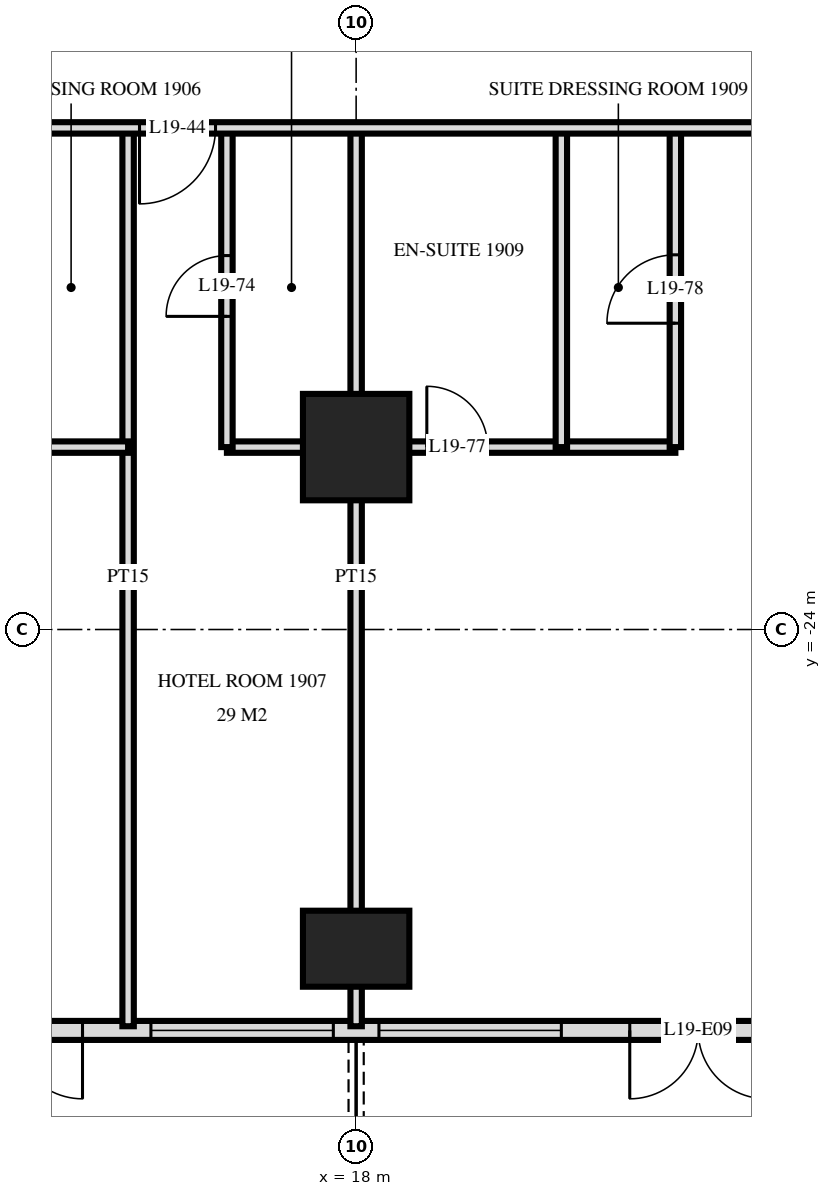
"""IFC4 building model, lengths in metres.
Left out: names, types, materials, properties, quantities, classifications, styles, units other than length and angle.
Written with IfcOpenShell. Run it as: python <this file> out.ifc"""

import sys

from ifc_helpers import new_model, si_unit, direction, frame, frame_2d, origin, origin_2d, place, context, subcontext, project, spatial, rectangle, extrude, element, fill, save


model = new_model("IFC4")
c1 = context("Model", 3, precision=1e-05, world=origin(), true_north=direction((0.0, 1.0)))
c2 = subcontext(c1, "Body", "Model", "MODEL_VIEW")
j1 = project(units=[si_unit("LENGTHUNIT", "METRE"), si_unit("PLANEANGLEUNIT", "RADIAN")], contexts=[c1])
p1 = place(None, origin())
s1 = spatial("IfcSite", under=j1, at=p1, CompositionType="ELEMENT")
p2 = place(p1, origin())
s2 = spatial("IfcBuilding", under=s1, at=p2, CompositionType="ELEMENT")
p3 = place(p2, frame((0.0, 0.0, 78.0)))
s3 = spatial("IfcBuildingStorey", under=s2, at=p3, CompositionType="ELEMENT", Elevation=78.0)
p4 = place(p3, frame((18.0, -28.2, 0.0), z_axis=(0.0, 0.0, 1.0), x_axis=(1.0, 0.0, 0.0)))
e1 = element("IfcColumn", 1, at=p4, inside=s3, PredefinedType="COLUMN", context=c2, shape_type="SweptSolid", body=[
    extrude(rectangle(XDim=1.4, YDim=1.0, at=origin_2d()), origin(), (0.0, 0.0, 1.0), 3.6),
])
p5 = place(p3, frame((18.0, -21.6, 0.0), z_axis=(0.0, 0.0, 1.0), x_axis=(1.0, 0.0, 0.0)))
e2 = element("IfcColumn", 2, at=p5, inside=s3, PredefinedType="COLUMN", context=c2, shape_type="SweptSolid", body=[
    extrude(rectangle(XDim=1.4, YDim=1.4, at=origin_2d()), origin(), (0.0, 0.0, 1.0), 3.6),
])
p6 = place(p3, frame((-28.775, -29.275, 0.0), z_axis=(0.0, 0.0, 1.0), x_axis=(1.0, 0.0, 0.0)))
e3 = element("IfcWall", 3, at=p6, inside=s3, PredefinedType="SOLIDWALL", context=c2, shape_type="SweptSolid", body=[
    extrude(rectangle(XDim=57.551, YDim=0.25, at=frame_2d((28.775, 0.0))), origin(), (0.0, 0.0, 1.0), 3.32),
])
p7 = place(p6, frame((0.575, 0.0, 0.0)))
e4 = element("IfcOpeningElement", 4, at=p7, cuts=e3, PredefinedType="OPENING", context=c2, shape_type="SweptSolid", body=[
    extrude(rectangle(XDim=1.8, YDim=2.4, at=frame_2d((0.9, 1.2))), frame((0.0, 0.135, 0.0), z_axis=(0.0, -1.0, 0.0), x_axis=(1.0, 0.0, 0.0)), (0.0, 0.0, 1.0), 0.27),
])
p8 = place(p6, frame((5.375, 0.0, 0.0)))
e5 = element("IfcOpeningElement", 5, at=p8, cuts=e3, PredefinedType="OPENING", context=c2, shape_type="SweptSolid", body=[
    extrude(rectangle(XDim=1.8, YDim=2.4, at=frame_2d((0.9, 1.2))), frame((0.0, 0.135, 0.0), z_axis=(0.0, -1.0, 0.0), x_axis=(1.0, 0.0, 0.0)), (0.0, 0.0, 1.0), 0.27),
])
p9 = place(p6, frame((8.075, 0.0, 0.3)))
e6 = element("IfcOpeningElement", 6, at=p9, cuts=e3, PredefinedType="OPENING", context=c2, shape_type="SweptSolid", body=[
    extrude(rectangle(XDim=2.4, YDim=2.1, at=frame_2d((1.2, 1.05))), frame((0.0, 0.135, 0.0), z_axis=(0.0, -1.0, 0.0), x_axis=(1.0, 0.0, 0.0)), (0.0, 0.0, 1.0), 0.27),
])
p10 = place(p6, frame((11.375, 0.0, 0.0)))
e7 = element("IfcOpeningElement", 7, at=p10, cuts=e3, PredefinedType="OPENING", context=c2, shape_type="SweptSolid", body=[
    extrude(rectangle(XDim=1.8, YDim=2.4, at=frame_2d((0.9, 1.2))), frame((0.0, 0.135, 0.0), z_axis=(0.0, -1.0, 0.0), x_axis=(1.0, 0.0, 0.0)), (0.0, 0.0, 1.0), 0.27),
])
p11 = place(p6, frame((14.075, 0.0, 0.3)))
e8 = element("IfcOpeningElement", 8, at=p11, cuts=e3, PredefinedType="OPENING", context=c2, shape_type="SweptSolid", body=[
    extrude(rectangle(XDim=2.4, YDim=2.1, at=frame_2d((1.2, 1.05))), frame((0.0, 0.135, 0.0), z_axis=(0.0, -1.0, 0.0), x_axis=(1.0, 0.0, 0.0)), (0.0, 0.0, 1.0), 0.27),
])
p12 = place(p6, frame((17.075, 0.0, 0.3)))
e9 = element("IfcOpeningElement", 9, at=p12, cuts=e3, PredefinedType="OPENING", context=c2, shape_type="SweptSolid", body=[
    extrude(rectangle(XDim=2.4, YDim=2.1, at=frame_2d((1.2, 1.05))), frame((0.0, 0.135, 0.0), z_axis=(0.0, -1.0, 0.0), x_axis=(1.0, 0.0, 0.0)), (0.0, 0.0, 1.0), 0.27),
])
p13 = place(p6, frame((20.375, 0.0, 0.0)))
e10 = element("IfcOpeningElement", 10, at=p13, cuts=e3, PredefinedType="OPENING", context=c2, shape_type="SweptSolid", body=[
    extrude(rectangle(XDim=1.8, YDim=2.4, at=frame_2d((0.9, 1.2))), frame((0.0, 0.135, 0.0), z_axis=(0.0, -1.0, 0.0), x_axis=(1.0, 0.0, 0.0)), (0.0, 0.0, 1.0), 0.27),
])
p14 = place(p6, frame((23.375, 0.0, 0.0)))
e11 = element("IfcOpeningElement", 11, at=p14, cuts=e3, PredefinedType="OPENING", context=c2, shape_type="SweptSolid", body=[
    extrude(rectangle(XDim=1.8, YDim=2.4, at=frame_2d((0.9, 1.2))), frame((0.0, 0.135, 0.0), z_axis=(0.0, -1.0, 0.0), x_axis=(1.0, 0.0, 0.0)), (0.0, 0.0, 1.0), 0.27),
])
p15 = place(p6, frame((26.075, 0.0, 0.3)))
e12 = element("IfcOpeningElement", 12, at=p15, cuts=e3, PredefinedType="OPENING", context=c2, shape_type="SweptSolid", body=[
    extrude(rectangle(XDim=2.4, YDim=2.1, at=frame_2d((1.2, 1.05))), frame((0.0, 0.135, 0.0), z_axis=(0.0, -1.0, 0.0), x_axis=(1.0, 0.0, 0.0)), (0.0, 0.0, 1.0), 0.27),
])
p16 = place(p6, frame((29.375, 0.0, 0.0)))
e13 = element("IfcOpeningElement", 13, at=p16, cuts=e3, PredefinedType="OPENING", context=c2, shape_type="SweptSolid", body=[
    extrude(rectangle(XDim=1.8, YDim=2.4, at=frame_2d((0.9, 1.2))), frame((0.0, 0.135, 0.0), z_axis=(0.0, -1.0, 0.0), x_axis=(1.0, 0.0, 0.0)), (0.0, 0.0, 1.0), 0.27),
])
p17 = place(p6, frame((32.075, 0.0, 0.3)))
e14 = element("IfcOpeningElement", 14, at=p17, cuts=e3, PredefinedType="OPENING", context=c2, shape_type="SweptSolid", body=[
    extrude(rectangle(XDim=2.4, YDim=2.1, at=frame_2d((1.2, 1.05))), frame((0.0, 0.135, 0.0), z_axis=(0.0, -1.0, 0.0), x_axis=(1.0, 0.0, 0.0)), (0.0, 0.0, 1.0), 0.27),
])
p18 = place(p6, frame((35.375, 0.0, 0.0)))
e15 = element("IfcOpeningElement", 15, at=p18, cuts=e3, PredefinedType="OPENING", context=c2, shape_type="SweptSolid", body=[
    extrude(rectangle(XDim=1.8, YDim=2.4, at=frame_2d((0.9, 1.2))), frame((0.0, 0.135, 0.0), z_axis=(0.0, -1.0, 0.0), x_axis=(1.0, 0.0, 0.0)), (0.0, 0.0, 1.0), 0.27),
])
p19 = place(p6, frame((38.075, 0.0, 0.3)))
e16 = element("IfcOpeningElement", 16, at=p19, cuts=e3, PredefinedType="OPENING", context=c2, shape_type="SweptSolid", body=[
    extrude(rectangle(XDim=2.4, YDim=2.1, at=frame_2d((1.2, 1.05))), frame((0.0, 0.135, 0.0), z_axis=(0.0, -1.0, 0.0), x_axis=(1.0, 0.0, 0.0)), (0.0, 0.0, 1.0), 0.27),
])
p20 = place(p6, frame((41.375, 0.0, 0.0)))
e17 = element("IfcOpeningElement", 17, at=p20, cuts=e3, PredefinedType="OPENING", context=c2, shape_type="SweptSolid", body=[
    extrude(rectangle(XDim=1.8, YDim=2.4, at=frame_2d((0.9, 1.2))), frame((0.0, 0.135, 0.0), z_axis=(0.0, -1.0, 0.0), x_axis=(1.0, 0.0, 0.0)), (0.0, 0.0, 1.0), 0.27),
])
p21 = place(p6, frame((44.075, 0.0, 0.3)))
e18 = element("IfcOpeningElement", 18, at=p21, cuts=e3, PredefinedType="OPENING", context=c2, shape_type="SweptSolid", body=[
    extrude(rectangle(XDim=2.4, YDim=2.1, at=frame_2d((1.2, 1.05))), frame((0.0, 0.135, 0.0), z_axis=(0.0, -1.0, 0.0), x_axis=(1.0, 0.0, 0.0)), (0.0, 0.0, 1.0), 0.27),
])
p22 = place(p6, frame((47.075, 0.0, 0.3)))
e19 = element("IfcOpeningElement", 19, at=p22, cuts=e3, PredefinedType="OPENING", context=c2, shape_type="SweptSolid", body=[
    extrude(rectangle(XDim=2.4, YDim=2.1, at=frame_2d((1.2, 1.05))), frame((0.0, 0.135, 0.0), z_axis=(0.0, -1.0, 0.0), x_axis=(1.0, 0.0, 0.0)), (0.0, 0.0, 1.0), 0.27),
])
p23 = place(p6, frame((50.375, 0.0, 0.0)))
e20 = element("IfcOpeningElement", 20, at=p23, cuts=e3, PredefinedType="OPENING", context=c2, shape_type="SweptSolid", body=[
    extrude(rectangle(XDim=1.8, YDim=2.4, at=frame_2d((0.9, 1.2))), frame((0.0, 0.135, 0.0), z_axis=(0.0, -1.0, 0.0), x_axis=(1.0, 0.0, 0.0)), (0.0, 0.0, 1.0), 0.27),
])
p24 = place(p6, frame((53.375, 0.0, 0.0)))
e21 = element("IfcOpeningElement", 21, at=p24, cuts=e3, PredefinedType="OPENING", context=c2, shape_type="SweptSolid", body=[
    extrude(rectangle(XDim=1.8, YDim=2.4, at=frame_2d((0.9, 1.2))), frame((0.0, 0.135, 0.0), z_axis=(0.0, -1.0, 0.0), x_axis=(1.0, 0.0, 0.0)), (0.0, 0.0, 1.0), 0.27),
])
p25 = place(p3, frame((22.2, -21.6, 0.0), z_axis=(0.0, 0.0, 1.0), x_axis=(0.0, 1.0, 0.0)))
e22 = element("IfcWall", 22, at=p25, inside=s3, PredefinedType="PARTITIONING", context=c2, shape_type="SweptSolid", body=[
    extrude(rectangle(XDim=4.2, YDim=0.15, at=frame_2d((2.1, 0.0))), origin(), (0.0, 0.0, 1.0), 3.32),
])
p26 = place(p25, frame((1.63, 0.0, 0.0)))
e23 = element("IfcOpeningElement", 23, at=p26, cuts=e22, PredefinedType="OPENING", context=c2, shape_type="SweptSolid", body=[
    extrude(rectangle(XDim=0.9, YDim=2.1, at=frame_2d((0.45, 1.05))), frame((0.0, 0.085, 0.0), z_axis=(0.0, -1.0, 0.0), x_axis=(1.0, 0.0, 0.0)), (0.0, 0.0, 1.0), 0.17),
])
p27 = place(p3, frame((20.7, -21.6, 0.0), z_axis=(0.0, 0.0, 1.0), x_axis=(0.0, 1.0, 0.0)))
e24 = element("IfcWall", 24, at=p27, inside=s3, PredefinedType="PARTITIONING", context=c2, shape_type="SweptSolid", body=[
    extrude(rectangle(XDim=4.2, YDim=0.15, at=frame_2d((2.1, 0.0))), origin(), (0.0, 0.0, 1.0), 3.32),
])
p28 = place(p3, frame((18.0, -29.22, 0.0), z_axis=(0.0, 0.0, 1.0), x_axis=(0.0, 1.0, 0.0)))
e25 = element("IfcWall", 25, at=p28, inside=s3, PredefinedType="PARTITIONING", context=c2, shape_type="SweptSolid", body=[
    extrude(rectangle(XDim=11.82, YDim=0.15, at=frame_2d((5.91, 0.0))), origin(), (0.0, 0.0, 1.0), 3.32),
])
p29 = place(p3, frame((16.3, -21.6, 0.0), z_axis=(0.0, 0.0, 1.0), x_axis=(0.0, 1.0, 0.0)))
e26 = element("IfcWall", 26, at=p29, inside=s3, PredefinedType="PARTITIONING", context=c2, shape_type="SweptSolid", body=[
    extrude(rectangle(XDim=4.2, YDim=0.15, at=frame_2d((2.1, 0.0))), origin(), (0.0, 0.0, 1.0), 3.32),
])
p30 = place(p29, frame((1.72, 0.0, 0.0)))
e27 = element("IfcOpeningElement", 27, at=p30, cuts=e26, PredefinedType="OPENING", context=c2, shape_type="SweptSolid", body=[
    extrude(rectangle(XDim=0.8, YDim=2.1, at=frame_2d((0.4, 1.05))), frame((0.0, 0.085, 0.0), z_axis=(0.0, -1.0, 0.0), x_axis=(1.0, 0.0, 0.0)), (0.0, 0.0, 1.0), 0.17),
])
p31 = place(p3, frame((15.0, -29.22, 0.0), z_axis=(0.0, 0.0, 1.0), x_axis=(0.0, 1.0, 0.0)))
e28 = element("IfcWall", 28, at=p31, inside=s3, PredefinedType="PARTITIONING", context=c2, shape_type="SweptSolid", body=[
    extrude(rectangle(XDim=11.82, YDim=0.15, at=frame_2d((5.91, 0.0))), origin(), (0.0, 0.0, 1.0), 3.32),
])
p32 = place(p3, frame((13.5, -21.6, 0.0), z_axis=(0.0, 0.0, 1.0), x_axis=(1.0, 0.0, 0.0)))
e29 = element("IfcWall", 29, at=p32, inside=s3, PredefinedType="PARTITIONING", context=c2, shape_type="SweptSolid", body=[
    extrude(rectangle(XDim=1.5, YDim=0.15, at=frame_2d((0.75, 0.0))), origin(), (0.0, 0.0, 1.0), 3.32),
])
p33 = place(p3, frame((16.3, -21.6, 0.0), z_axis=(0.0, 0.0, 1.0), x_axis=(1.0, 0.0, 0.0)))
e30 = element("IfcWall", 30, at=p33, inside=s3, PredefinedType="PARTITIONING", context=c2, shape_type="SweptSolid", body=[
    extrude(rectangle(XDim=5.9, YDim=0.15, at=frame_2d((2.95, 0.0))), origin(), (0.0, 0.0, 1.0), 3.32),
])
p34 = place(p33, frame((2.63, 0.0, 0.0)))
e31 = element("IfcOpeningElement", 31, at=p34, cuts=e30, PredefinedType="OPENING", context=c2, shape_type="SweptSolid", body=[
    extrude(rectangle(XDim=0.8, YDim=2.1, at=frame_2d((0.4, 1.05))), frame((0.0, 0.085, 0.0), z_axis=(0.0, -1.0, 0.0), x_axis=(1.0, 0.0, 0.0)), (0.0, 0.0, 1.0), 0.17),
])
p35 = place(p3, frame((-33.12, -17.4, 0.0), z_axis=(0.0, 0.0, 1.0), x_axis=(1.0, 0.0, 0.0)))
e32 = element("IfcWall", 32, at=p35, inside=s3, PredefinedType="PARTITIONING", context=c2, shape_type="SweptSolid", body=[
    extrude(rectangle(XDim=66.24, YDim=0.15, at=frame_2d((33.12, 0.0))), origin(), (0.0, 0.0, 1.0), 3.32),
])
p36 = place(p35, frame((10.27, 0.0, 0.0)))
e33 = element("IfcOpeningElement", 33, at=p36, cuts=e32, PredefinedType="OPENING", context=c2, shape_type="SweptSolid", body=[
    extrude(rectangle(XDim=1.0, YDim=2.1, at=frame_2d((0.5, 1.05))), frame((0.0, 0.085, 0.0), z_axis=(0.0, -1.0, 0.0), x_axis=(1.0, 0.0, 0.0)), (0.0, 0.0, 1.0), 0.17),
])
p37 = place(p35, frame((16.97, 0.0, 0.0)))
e34 = element("IfcOpeningElement", 34, at=p37, cuts=e32, PredefinedType="OPENING", context=c2, shape_type="SweptSolid", body=[
    extrude(rectangle(XDim=1.0, YDim=2.1, at=frame_2d((0.5, 1.05))), frame((0.0, 0.085, 0.0), z_axis=(0.0, -1.0, 0.0), x_axis=(1.0, 0.0, 0.0)), (0.0, 0.0, 1.0), 0.17),
])
p38 = place(p35, frame((28.42, 0.0, 0.0)))
e35 = element("IfcOpeningElement", 35, at=p38, cuts=e32, PredefinedType="OPENING", context=c2, shape_type="SweptSolid", body=[
    extrude(rectangle(XDim=1.0, YDim=2.1, at=frame_2d((0.5, 1.05))), frame((0.0, 0.085, 0.0), z_axis=(0.0, -1.0, 0.0), x_axis=(1.0, 0.0, 0.0)), (0.0, 0.0, 1.0), 0.17),
])
p39 = place(p35, frame((30.82, 0.0, 0.0)))
e36 = element("IfcOpeningElement", 36, at=p39, cuts=e32, PredefinedType="OPENING", context=c2, shape_type="SweptSolid", body=[
    extrude(rectangle(XDim=1.0, YDim=2.1, at=frame_2d((0.5, 1.05))), frame((0.0, 0.085, 0.0), z_axis=(0.0, -1.0, 0.0), x_axis=(1.0, 0.0, 0.0)), (0.0, 0.0, 1.0), 0.17),
])
p40 = place(p35, frame((39.27, 0.0, 0.0)))
e37 = element("IfcOpeningElement", 37, at=p40, cuts=e32, PredefinedType="OPENING", context=c2, shape_type="SweptSolid", body=[
    extrude(rectangle(XDim=1.0, YDim=2.1, at=frame_2d((0.5, 1.05))), frame((0.0, 0.085, 0.0), z_axis=(0.0, -1.0, 0.0), x_axis=(1.0, 0.0, 0.0)), (0.0, 0.0, 1.0), 0.17),
])
p41 = place(p35, frame((45.22, 0.0, 0.0)))
e38 = element("IfcOpeningElement", 38, at=p41, cuts=e32, PredefinedType="OPENING", context=c2, shape_type="SweptSolid", body=[
    extrude(rectangle(XDim=1.0, YDim=2.1, at=frame_2d((0.5, 1.05))), frame((0.0, 0.085, 0.0), z_axis=(0.0, -1.0, 0.0), x_axis=(1.0, 0.0, 0.0)), (0.0, 0.0, 1.0), 0.17),
])
p42 = place(p35, frame((48.27, 0.0, 0.0)))
e39 = element("IfcOpeningElement", 39, at=p42, cuts=e32, PredefinedType="OPENING", context=c2, shape_type="SweptSolid", body=[
    extrude(rectangle(XDim=1.0, YDim=2.1, at=frame_2d((0.5, 1.05))), frame((0.0, 0.085, 0.0), z_axis=(0.0, -1.0, 0.0), x_axis=(1.0, 0.0, 0.0)), (0.0, 0.0, 1.0), 0.17),
])
p43 = place(p35, frame((1.87, 0.0, 0.0)))
e40 = element("IfcOpeningElement", 40, at=p43, cuts=e32, PredefinedType="OPENING", context=c2, shape_type="SweptSolid", body=[
    extrude(rectangle(XDim=1.0, YDim=2.1, at=frame_2d((0.5, 1.05))), frame((0.0, 0.085, 0.0), z_axis=(0.0, -1.0, 0.0), x_axis=(1.0, 0.0, 0.0)), (0.0, 0.0, 1.0), 0.17),
])
p44 = place(p35, frame((60.37, 0.0, 0.0)))
e41 = element("IfcOpeningElement", 41, at=p44, cuts=e32, PredefinedType="OPENING", context=c2, shape_type="SweptSolid", body=[
    extrude(rectangle(XDim=1.0, YDim=2.1, at=frame_2d((0.5, 1.05))), frame((0.0, 0.085, 0.0), z_axis=(0.0, -1.0, 0.0), x_axis=(1.0, 0.0, 0.0)), (0.0, 0.0, 1.0), 0.17),
])
p45 = place(p20, frame((0.9, 0.0, 0.0), z_axis=(0.0, 0.0, 1.0), x_axis=(-1.0, 0.0, 0.0)))
e42 = element("IfcDoor", 42, at=p45, inside=s3, OperationType="DOUBLE_DOOR_SINGLE_SWING", PredefinedType="DOOR", context=c2, shape_type="SweptSolid", body=[
    extrude(rectangle(XDim=1.8, YDim=2.4, at=frame_2d((0.0, 1.2))), frame((0.0, -0.025, 0.0), z_axis=(0.0, 1.0, 0.0), x_axis=(-1.0, 0.0, 0.0)), (0.0, 0.0, 1.0), 0.05),
])
fill(e17, e42)
p46 = place(p21, origin())
e43 = element("IfcWindow", 43, at=p46, inside=s3, PartitioningType="SINGLE_PANEL", PredefinedType="WINDOW", context=c2, shape_type="SweptSolid", body=[
    extrude(rectangle(XDim=2.4, YDim=2.1, at=frame_2d((1.2, 1.05))), frame((0.0, 0.03, 0.0), z_axis=(0.0, -1.0, 0.0), x_axis=(1.0, 0.0, 0.0)), (0.0, 0.0, 1.0), 0.06),
])
fill(e18, e43)
p47 = place(p22, origin())
e44 = element("IfcWindow", 44, at=p47, inside=s3, PartitioningType="SINGLE_PANEL", PredefinedType="WINDOW", context=c2, shape_type="SweptSolid", body=[
    extrude(rectangle(XDim=2.4, YDim=2.1, at=frame_2d((1.2, 1.05))), frame((0.0, 0.03, 0.0), z_axis=(0.0, -1.0, 0.0), x_axis=(1.0, 0.0, 0.0)), (0.0, 0.0, 1.0), 0.06),
])
fill(e19, e44)
p48 = place(p23, frame((0.9, 0.0, 0.0), z_axis=(0.0, 0.0, 1.0), x_axis=(-1.0, 0.0, 0.0)))
e45 = element("IfcDoor", 45, at=p48, inside=s3, OperationType="DOUBLE_DOOR_SINGLE_SWING", PredefinedType="DOOR", context=c2, shape_type="SweptSolid", body=[
    extrude(rectangle(XDim=1.8, YDim=2.4, at=frame_2d((0.0, 1.2))), frame((0.0, -0.025, 0.0), z_axis=(0.0, 1.0, 0.0), x_axis=(-1.0, 0.0, 0.0)), (0.0, 0.0, 1.0), 0.05),
])
fill(e20, e45)
p49 = place(p42, frame((0.5, 0.0, 0.0), z_axis=(0.0, 0.0, 1.0), x_axis=(-1.0, 0.0, 0.0)))
e46 = element("IfcDoor", 46, at=p49, inside=s3, OperationType="SINGLE_SWING_LEFT", PredefinedType="DOOR", context=c2, shape_type="SweptSolid", body=[
    extrude(rectangle(XDim=1.0, YDim=2.1, at=frame_2d((0.0, 1.05))), frame((0.0, -0.025, 0.0), z_axis=(0.0, 1.0, 0.0), x_axis=(-1.0, 0.0, 0.0)), (0.0, 0.0, 1.0), 0.05),
])
fill(e39, e46)
p50 = place(p30, origin())
e47 = element("IfcDoor", 47, at=p50, inside=s3, OperationType="SINGLE_SWING_RIGHT", PredefinedType="DOOR", context=c2, shape_type="SweptSolid", body=[
    extrude(rectangle(XDim=0.8, YDim=2.1, at=frame_2d((0.4, 1.05))), frame((0.0, 0.025, 0.0), z_axis=(0.0, -1.0, 0.0), x_axis=(1.0, 0.0, 0.0)), (0.0, 0.0, 1.0), 0.05),
])
fill(e27, e47)
p51 = place(p34, origin())
e48 = element("IfcDoor", 48, at=p51, inside=s3, OperationType="SINGLE_SWING_RIGHT", PredefinedType="DOOR", context=c2, shape_type="SweptSolid", body=[
    extrude(rectangle(XDim=0.8, YDim=2.1, at=frame_2d((0.4, 1.05))), frame((0.0, 0.025, 0.0), z_axis=(0.0, -1.0, 0.0), x_axis=(1.0, 0.0, 0.0)), (0.0, 0.0, 1.0), 0.05),
])
fill(e31, e48)
p52 = place(p26, origin())
e49 = element("IfcDoor", 49, at=p52, inside=s3, OperationType="SINGLE_SWING_RIGHT", PredefinedType="DOOR", context=c2, shape_type="SweptSolid", body=[
    extrude(rectangle(XDim=0.9, YDim=2.1, at=frame_2d((0.45, 1.05))), frame((0.0, 0.025, 0.0), z_axis=(0.0, -1.0, 0.0), x_axis=(1.0, 0.0, 0.0)), (0.0, 0.0, 1.0), 0.05),
])
fill(e23, e49)
save(model, sys.argv[1])
